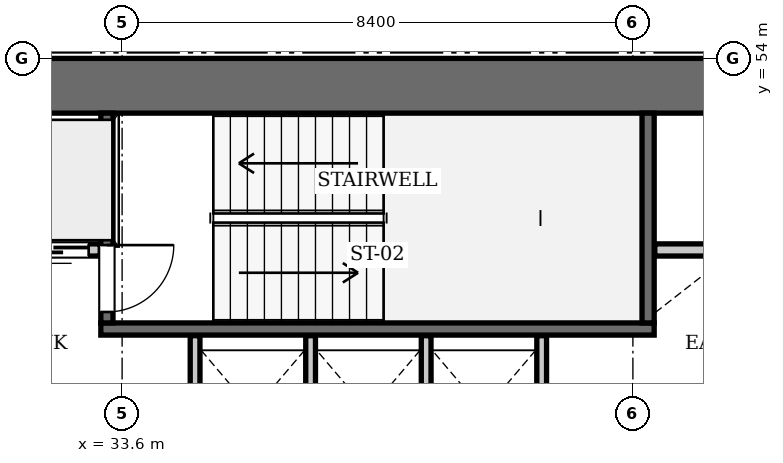
"""IFC4 building model, lengths in metres.
Left out: names, types, materials, properties, quantities, classifications, styles, units other than length and angle.
Written with IfcOpenShell. Run it as: python <this file> out.ifc"""

import sys

from ifc_helpers import new_model, si_unit, direction, frame, frame_2d, origin, place, context, subcontext, project, spatial, rectangle, extrude, element, fill, save


model = new_model("IFC4")
c1 = context("Model", 3, precision=1e-05, world=origin(), true_north=direction((0.0, 1.0)))
c2 = subcontext(c1, "Body", "Model", "MODEL_VIEW")
j1 = project(units=[si_unit("LENGTHUNIT", "METRE"), si_unit("PLANEANGLEUNIT", "RADIAN")], contexts=[c1])
p1 = place(None, origin())
s1 = spatial("IfcSite", under=j1, at=p1, CompositionType="ELEMENT")
p2 = place(p1, origin())
s2 = spatial("IfcBuilding", under=s1, at=p2, CompositionType="ELEMENT")
p3 = place(p2, frame((0.0, 0.0, 26.95)))
s3 = spatial("IfcBuildingStorey", under=s2, at=p3, CompositionType="ELEMENT", Elevation=26.95)
p4 = place(p3, frame((25.2, 53.55, 0.0), z_axis=(0.0, 0.0, 1.0), x_axis=(1.0, 0.0, 0.0)))
e1 = element("IfcWall", 1, at=p4, inside=s3, PredefinedType="SHEAR", context=c2, shape_type="SweptSolid", body=[
    extrude(rectangle(XDim=25.2, YDim=0.9, at=frame_2d((12.6, 0.0))), origin(), (0.0, 0.0, 1.0), 3.85),
])
p5 = place(p3, frame((33.25, 49.55, 0.0), z_axis=(0.0, 0.0, 1.0), x_axis=(1.0, 0.0, 0.0)))
e2 = element("IfcWall", 2, at=p5, inside=s3, PredefinedType="SOLIDWALL", context=c2, shape_type="SweptSolid", body=[
    extrude(rectangle(XDim=9.1, YDim=0.2, at=frame_2d((4.55, 0.0))), origin(), (0.0, 0.0, 1.0), 3.61),
])
p6 = place(p3, frame((42.25, 49.65, 0.0), z_axis=(0.0, 0.0, 1.0), x_axis=(0.0, 1.0, 0.0)))
e3 = element("IfcWall", 3, at=p6, inside=s3, PredefinedType="SOLIDWALL", context=c2, shape_type="SweptSolid", body=[
    extrude(rectangle(XDim=3.45, YDim=0.2, at=frame_2d((1.725, 0.0))), origin(), (0.0, 0.0, 1.0), 3.61),
])
p7 = place(p3, frame((33.35, 49.65, 0.0), z_axis=(0.0, 0.0, 1.0), x_axis=(0.0, 1.0, 0.0)))
e4 = element("IfcWall", 4, at=p7, inside=s3, PredefinedType="SOLIDWALL", context=c2, shape_type="SweptSolid", body=[
    extrude(rectangle(XDim=3.45, YDim=0.2, at=frame_2d((1.725, 0.0))), origin(), (0.0, 0.0, 1.0), 3.61),
])
p8 = place(p7, frame((0.18, 0.0, 0.0)))
e5 = element("IfcOpeningElement", 5, at=p8, cuts=e4, PredefinedType="OPENING", context=c2, shape_type="SweptSolid", body=[
    extrude(rectangle(XDim=1.1, YDim=2.15, at=frame_2d((0.55, 1.075))), frame((0.0, 0.11, 0.0), z_axis=(0.0, -1.0, 0.0), x_axis=(1.0, 0.0, 0.0)), (0.0, 0.0, 1.0), 0.22),
])
p9 = place(p3, frame((31.86, 50.85, 0.0), z_axis=(0.0, 0.0, 1.0), x_axis=(1.0, 0.0, 0.0)))
e6 = element("IfcWall", 6, at=p9, inside=s3, PredefinedType="SOLIDWALL", context=c2, shape_type="SweptSolid", body=[
    extrude(rectangle(XDim=1.38, YDim=0.2, at=frame_2d((0.69, 0.0))), origin(), (0.0, 0.0, 1.0), 3.61),
])
p10 = place(p9, frame((0.19, 0.0, 0.0)))
e7 = element("IfcOpeningElement", 7, at=p10, cuts=e6, PredefinedType="OPENING", context=c2, shape_type="SweptSolid", body=[
    extrude(rectangle(XDim=1.0, YDim=2.15, at=frame_2d((0.5, 1.075))), frame((0.0, 0.11, 0.0), z_axis=(0.0, -1.0, 0.0), x_axis=(1.0, 0.0, 0.0)), (0.0, 0.0, 1.0), 0.22),
])
p11 = place(p3, frame((42.36, 50.85, 0.0), z_axis=(0.0, 0.0, 1.0), x_axis=(1.0, 0.0, 0.0)))
e8 = element("IfcWall", 8, at=p11, inside=s3, PredefinedType="SOLIDWALL", context=c2, shape_type="SweptSolid", body=[
    extrude(rectangle(XDim=1.38, YDim=0.2, at=frame_2d((0.69, 0.0))), origin(), (0.0, 0.0, 1.0), 3.61),
])
for number, where, z_axis, x_axis in (
    (9, (34.8, 47.25, 0.0), (0.0, 0.0, 1.0), (0.0, 1.0, 0.0)),
    (10, (36.7, 47.25, 0.0), (0.0, 0.0, 1.0), (0.0, 1.0, 0.0)),
    (11, (38.6, 47.25, 0.0), (0.0, 0.0, 1.0), (0.0, 1.0, 0.0)),
    (12, (40.5, 47.25, 0.0), (0.0, 0.0, 1.0), (0.0, 1.0, 0.0)),
):
    element("IfcWall", number, at=place(p3, frame(where, z_axis=z_axis, x_axis=x_axis)), inside=s3, PredefinedType="SOLIDWALL", context=c2, shape_type="SweptSolid", body=[
        extrude(rectangle(XDim=2.19, YDim=0.16, at=frame_2d((1.095, 0.0))), origin(), (0.0, 0.0, 1.0), 3.61),
    ])
p12 = place(p8, frame((1.1, 0.0, 0.0), z_axis=(0.0, 0.0, 1.0), x_axis=(-1.0, 0.0, 0.0)))
e13 = element("IfcDoor", 13, at=p12, inside=s3, OperationType="SINGLE_SWING_LEFT", PredefinedType="DOOR", context=c2, shape_type="SweptSolid", body=[
    extrude(rectangle(XDim=1.1, YDim=2.15, at=frame_2d((0.55, 1.075))), frame((0.0, 0.025, 0.0), z_axis=(0.0, -1.0, 0.0), x_axis=(1.0, 0.0, 0.0)), (0.0, 0.0, 1.0), 0.05),
])
fill(e5, e13)
p13 = place(p10, frame((1.0, 0.0, 0.0), z_axis=(0.0, 0.0, 1.0), x_axis=(-1.0, 0.0, 0.0)))
e14 = element("IfcDoor", 14, at=p13, inside=s3, OperationType="SLIDING_TO_LEFT", PredefinedType="DOOR", context=c2, shape_type="SweptSolid", body=[
    extrude(rectangle(XDim=1.0, YDim=2.15, at=frame_2d((0.5, 1.075))), frame((0.0, 0.025, 0.0), z_axis=(0.0, -1.0, 0.0), x_axis=(1.0, 0.0, 0.0)), (0.0, 0.0, 1.0), 0.05),
])
fill(e7, e14)
save(model, sys.argv[1])
